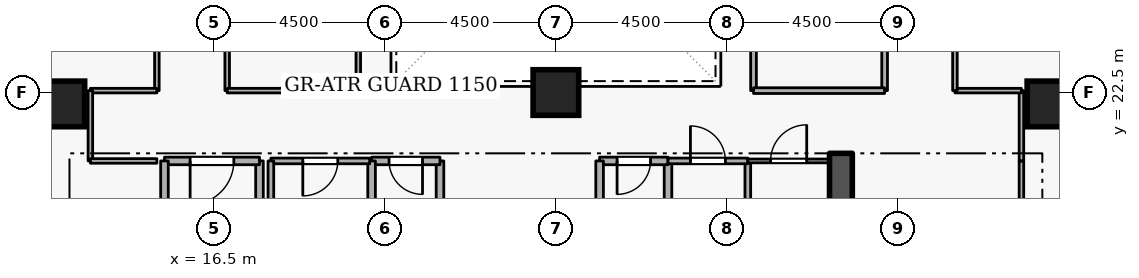
"""IFC4 building model, lengths in metres.
Left out: names, types, materials, properties, quantities, classifications, styles, units other than length and angle.
Written with IfcOpenShell. Run it as: python <this file> out.ifc"""

import sys

from ifc_helpers import new_model, si_unit, direction, frame, frame_2d, origin, origin_2d, place, context, subcontext, project, spatial, rectangle, extrude, element, fill, save


model = new_model("IFC4")
c1 = context("Model", 3, precision=1e-05, world=origin(), true_north=direction((0.0, 1.0)))
c2 = subcontext(c1, "Body", "Model", "MODEL_VIEW")
j1 = project(units=[si_unit("LENGTHUNIT", "METRE"), si_unit("PLANEANGLEUNIT", "RADIAN")], contexts=[c1])
p1 = place(None, origin())
s1 = spatial("IfcSite", under=j1, at=p1, CompositionType="ELEMENT")
p2 = place(p1, origin())
s2 = spatial("IfcBuilding", under=s1, at=p2, CompositionType="ELEMENT")
p3 = place(p2, frame((0.0, 0.0, 108.9)))
s3 = spatial("IfcBuildingStorey", under=s2, at=p3, CompositionType="ELEMENT", Elevation=108.9)
p4 = place(p3, frame((33.0, 15.2, 0.0), z_axis=(0.0, 0.0, 1.0), x_axis=(0.0, 1.0, 0.0)))
e1 = element("IfcWall", 1, at=p4, inside=s3, PredefinedType="SHEAR", context=c2, shape_type="SweptSolid", body=[
    extrude(rectangle(XDim=5.7, YDim=0.6, at=frame_2d((2.85, 0.0))), origin(), (0.0, 0.0, 1.0), 3.6),
])
for number, where, z_axis, x_axis in (
    (2, (12.5, 22.2, 0.0), (0.0, 0.0, 1.0), (1.0, 0.0, 0.0)),
    (3, (38.5, 22.2, 0.0), (0.0, 0.0, 1.0), (1.0, 0.0, 0.0)),
    (4, (25.5, 22.5, 0.0), (0.0, 0.0, 1.0), (1.0, 0.0, 0.0)),
):
    element("IfcColumn", number, at=place(p3, frame(where, z_axis=z_axis, x_axis=x_axis)), inside=s3, PredefinedType="COLUMN", context=c2, shape_type="SweptSolid", body=[
        extrude(rectangle(XDim=1.2, YDim=1.2, at=origin_2d()), origin(), (0.0, 0.0, 1.0), 3.6),
    ])
p5 = place(p3, frame((17.7, 18.4, 0.0), z_axis=(0.0, 0.0, 1.0), x_axis=(0.0, 1.0, 0.0)))
e5 = element("IfcWall", 5, at=p5, inside=s3, PredefinedType="STANDARD", context=c2, shape_type="SweptSolid", body=[
    extrude(rectangle(XDim=2.3, YDim=0.2, at=frame_2d((1.15, 0.0))), origin(), (0.0, 0.0, 1.0), 2.545),
])
p6 = place(p3, frame((17.7, 20.7, 0.0), z_axis=(0.0, 0.0, 1.0), x_axis=(-1.0, 0.0, 0.0)))
e6 = element("IfcWall", 6, at=p6, inside=s3, PredefinedType="STANDARD", context=c2, shape_type="SweptSolid", body=[
    extrude(rectangle(XDim=2.5, YDim=0.2, at=frame_2d((1.25, 0.0))), origin(), (0.0, 0.0, 1.0), 3.34),
])
p7 = place(p6, frame((0.675, 0.0, 0.0)))
e7 = element("IfcOpeningElement", 7, at=p7, cuts=e6, PredefinedType="OPENING", context=c2, shape_type="SweptSolid", body=[
    extrude(rectangle(XDim=1.15, YDim=2.1, at=frame_2d((0.575, 1.05))), frame((0.0, 0.11, 0.0), z_axis=(0.0, -1.0, 0.0), x_axis=(1.0, 0.0, 0.0)), (0.0, 0.0, 1.0), 0.22),
])
p8 = place(p3, frame((15.2, 20.7, 0.0), z_axis=(0.0, 0.0, 1.0), x_axis=(0.0, -1.0, 0.0)))
e8 = element("IfcWall", 8, at=p8, inside=s3, PredefinedType="STANDARD", context=c2, shape_type="SweptSolid", body=[
    extrude(rectangle(XDim=5.7, YDim=0.2, at=frame_2d((2.85, 0.0))), origin(), (0.0, 0.0, 1.0), 3.34),
])
p9 = place(p3, frame((28.45, 18.65, 0.0), z_axis=(0.0, 0.0, 1.0), x_axis=(0.0, 1.0, 0.0)))
e9 = element("IfcWall", 9, at=p9, inside=s3, PredefinedType="STANDARD", context=c2, shape_type="SweptSolid", body=[
    extrude(rectangle(XDim=2.05, YDim=0.2, at=frame_2d((1.025, 0.0))), origin(), (0.0, 0.0, 1.0), 3.34),
])
p10 = place(p3, frame((28.45, 20.7, 0.0), z_axis=(0.0, 0.0, 1.0), x_axis=(-1.0, 0.0, 0.0)))
e10 = element("IfcWall", 10, at=p10, inside=s3, PredefinedType="STANDARD", context=c2, shape_type="SweptSolid", body=[
    extrude(rectangle(XDim=1.8, YDim=0.2, at=frame_2d((0.9, 0.0))), origin(), (0.0, 0.0, 1.0), 3.34),
])
p11 = place(p10, frame((0.46, 0.0, 0.0)))
e11 = element("IfcOpeningElement", 11, at=p11, cuts=e10, PredefinedType="OPENING", context=c2, shape_type="SweptSolid", body=[
    extrude(rectangle(XDim=0.88, YDim=2.04, at=frame_2d((0.44, 1.02))), frame((0.0, 0.11, 0.0), z_axis=(0.0, -1.0, 0.0), x_axis=(1.0, 0.0, 0.0)), (0.0, 0.0, 1.0), 0.22),
])
for number, where, z_axis, x_axis in (
    (12, (26.65, 20.7, 0.0), (0.0, 0.0, 1.0), (0.0, -1.0, 0.0)),
    (13, (22.45, 18.65, 0.0), (0.0, 0.0, 1.0), (0.0, 1.0, 0.0)),
):
    element("IfcWall", number, at=place(p3, frame(where, z_axis=z_axis, x_axis=x_axis)), inside=s3, PredefinedType="STANDARD", context=c2, shape_type="SweptSolid", body=[
        extrude(rectangle(XDim=2.05, YDim=0.2, at=frame_2d((1.025, 0.0))), origin(), (0.0, 0.0, 1.0), 3.34),
    ])
p12 = place(p3, frame((22.45, 20.7, 0.0), z_axis=(0.0, 0.0, 1.0), x_axis=(-1.0, 0.0, 0.0)))
e14 = element("IfcWall", 14, at=p12, inside=s3, PredefinedType="STANDARD", context=c2, shape_type="SweptSolid", body=[
    extrude(rectangle(XDim=1.8, YDim=0.2, at=frame_2d((0.9, 0.0))), origin(), (0.0, 0.0, 1.0), 3.34),
])
p13 = place(p12, frame((0.46, 0.0, 0.0)))
e15 = element("IfcOpeningElement", 15, at=p13, cuts=e14, PredefinedType="OPENING", context=c2, shape_type="SweptSolid", body=[
    extrude(rectangle(XDim=0.88, YDim=2.04, at=frame_2d((0.44, 1.02))), frame((0.0, 0.11, 0.0), z_axis=(0.0, -1.0, 0.0), x_axis=(1.0, 0.0, 0.0)), (0.0, 0.0, 1.0), 0.22),
])
p14 = place(p3, frame((20.65, 20.7, 0.0), z_axis=(0.0, 0.0, 1.0), x_axis=(0.0, -1.0, 0.0)))
e16 = element("IfcWall", 16, at=p14, inside=s3, PredefinedType="STANDARD", context=c2, shape_type="SweptSolid", body=[
    extrude(rectangle(XDim=2.05, YDim=0.2, at=frame_2d((1.025, 0.0))), origin(), (0.0, 0.0, 1.0), 3.34),
])
p15 = place(p3, frame((20.6, 20.7, 0.0), z_axis=(0.0, 0.0, 1.0), x_axis=(-1.0, 0.0, 0.0)))
e17 = element("IfcWall", 17, at=p15, inside=s3, PredefinedType="PARTITIONING", context=c2, shape_type="SweptSolid", body=[
    extrude(rectangle(XDim=2.6, YDim=0.15, at=frame_2d((1.3, 0.0))), origin(), (0.0, 0.0, 1.0), 3.34),
])
p16 = place(p15, frame((0.84, 0.0, 0.0)))
e18 = element("IfcOpeningElement", 18, at=p16, cuts=e17, PredefinedType="OPENING", context=c2, shape_type="SweptSolid", body=[
    extrude(rectangle(XDim=0.92, YDim=2.08, at=frame_2d((0.46, 1.04))), frame((0.0, 0.085, 0.0), z_axis=(0.0, -1.0, 0.0), x_axis=(1.0, 0.0, 0.0)), (0.0, 0.0, 1.0), 0.17),
])
p17 = place(p3, frame((18.0, 20.7, 0.0), z_axis=(0.0, 0.0, 1.0), x_axis=(0.0, -1.0, 0.0)))
e19 = element("IfcWall", 19, at=p17, inside=s3, PredefinedType="PARTITIONING", context=c2, shape_type="SweptSolid", body=[
    extrude(rectangle(XDim=2.05, YDim=0.15, at=frame_2d((1.025, 0.0))), origin(), (0.0, 0.0, 1.0), 2.545),
])
p18 = place(p3, frame((30.55, 20.7, 0.0), z_axis=(0.0, 0.0, 1.0), x_axis=(0.0, -1.0, 0.0)))
e20 = element("IfcWall", 20, at=p18, inside=s3, PredefinedType="PARTITIONING", context=c2, shape_type="SweptSolid", body=[
    extrude(rectangle(XDim=2.05, YDim=0.15, at=frame_2d((1.025, 0.0))), origin(), (0.0, 0.0, 1.0), 3.34),
])
p19 = place(p3, frame((28.45, 20.7, 0.0), z_axis=(0.0, 0.0, 1.0), x_axis=(1.0, 0.0, 0.0)))
e21 = element("IfcWall", 21, at=p19, inside=s3, PredefinedType="PARTITIONING", context=c2, shape_type="SweptSolid", body=[
    extrude(rectangle(XDim=2.1, YDim=0.15, at=frame_2d((1.05, 0.0))), origin(), (0.0, 0.0, 1.0), 3.34),
])
p20 = place(p19, frame((0.59, 0.0, 0.0)))
e22 = element("IfcOpeningElement", 22, at=p20, cuts=e21, PredefinedType="OPENING", context=c2, shape_type="SweptSolid", body=[
    extrude(rectangle(XDim=0.92, YDim=2.08, at=frame_2d((0.46, 1.04))), frame((0.0, 0.085, 0.0), z_axis=(0.0, -1.0, 0.0), x_axis=(1.0, 0.0, 0.0)), (0.0, 0.0, 1.0), 0.17),
])
p21 = place(p3, frame((30.55, 20.7, 0.0), z_axis=(0.0, 0.0, 1.0), x_axis=(1.0, 0.0, 0.0)))
e23 = element("IfcWall", 23, at=p21, inside=s3, PredefinedType="PARTITIONING", context=c2, shape_type="SweptSolid", body=[
    extrude(rectangle(XDim=2.15, YDim=0.1, at=frame_2d((1.075, 0.0))), origin(), (0.0, 0.0, 1.0), 3.34),
])
p22 = place(p21, frame((0.6, 0.0, 0.0)))
e24 = element("IfcOpeningElement", 24, at=p22, cuts=e23, PredefinedType="OPENING", context=c2, shape_type="SweptSolid", body=[
    extrude(rectangle(XDim=0.95, YDim=2.1, at=frame_2d((0.475, 1.05))), frame((0.0, 0.06, 0.0), z_axis=(0.0, -1.0, 0.0), x_axis=(1.0, 0.0, 0.0)), (0.0, 0.0, 1.0), 0.12),
])
p23 = place(p3, frame((15.0, 27.0, 0.0), z_axis=(0.0, 0.0, 1.0), x_axis=(0.0, -1.0, 0.0)))
e25 = element("IfcWall", 25, at=p23, inside=s3, PredefinedType="PARTITIONING", context=c2, shape_type="SweptSolid", body=[
    extrude(rectangle(XDim=4.45, YDim=0.12, at=frame_2d((2.225, 0.0))), origin(), (0.0, 0.0, 1.0), 3.34),
])
p24 = place(p23, frame((1.7, 0.0, 0.0)))
e26 = element("IfcOpeningElement", 26, at=p24, cuts=e25, PredefinedType="OPENING", context=c2, shape_type="SweptSolid", body=[
    extrude(rectangle(XDim=1.05, YDim=2.1, at=frame_2d((0.525, 1.05))), frame((0.0, 0.07, 0.0), z_axis=(0.0, -1.0, 0.0), x_axis=(1.0, 0.0, 0.0)), (0.0, 0.0, 1.0), 0.14),
])
p25 = place(p3, frame((15.0, 22.55, 0.0), z_axis=(0.0, 0.0, 1.0), x_axis=(-1.0, 0.0, 0.0)))
e27 = element("IfcWall", 27, at=p25, inside=s3, PredefinedType="PARTITIONING", context=c2, shape_type="SweptSolid", body=[
    extrude(rectangle(XDim=1.75, YDim=0.12, at=frame_2d((0.875, 0.0))), origin(), (0.0, 0.0, 1.0), 3.34),
])
p26 = place(p3, frame((13.25, 22.55, 0.0), z_axis=(0.0, 0.0, 1.0), x_axis=(0.0, -1.0, 0.0)))
e28 = element("IfcWall", 28, at=p26, inside=s3, PredefinedType="PARTITIONING", context=c2, shape_type="SweptSolid", body=[
    extrude(rectangle(XDim=1.85, YDim=0.12, at=frame_2d((0.925, 0.0))), origin(), (0.0, 0.0, 1.0), 3.34),
])
p27 = place(p3, frame((13.25, 20.7, 0.0), z_axis=(0.0, 0.0, 1.0), x_axis=(1.0, 0.0, 0.0)))
e29 = element("IfcWall", 29, at=p27, inside=s3, PredefinedType="PARTITIONING", context=c2, shape_type="SweptSolid", body=[
    extrude(rectangle(XDim=1.75, YDim=0.12, at=frame_2d((0.875, 0.0))), origin(), (0.0, 0.0, 1.0), 3.34),
])
p28 = place(p3, frame((37.75, 17.55, 0.0), z_axis=(0.0, 0.0, 1.0), x_axis=(0.0, 1.0, 0.0)))
e30 = element("IfcWall", 30, at=p28, inside=s3, PredefinedType="PARTITIONING", context=c2, shape_type="SweptSolid", body=[
    extrude(rectangle(XDim=3.15, YDim=0.12, at=frame_2d((1.575, 0.0))), origin(), (0.0, 0.0, 1.0), 3.34),
])
p29 = place(p3, frame((37.75, 20.7, 0.0), z_axis=(0.0, 0.0, 1.0), x_axis=(0.0, 1.0, 0.0)))
e31 = element("IfcWall", 31, at=p29, inside=s3, PredefinedType="PARTITIONING", context=c2, shape_type="SweptSolid", body=[
    extrude(rectangle(XDim=1.85, YDim=0.12, at=frame_2d((0.925, 0.0))), origin(), (0.0, 0.0, 1.0), 3.34),
])
p30 = place(p3, frame((37.75, 22.55, 0.0), z_axis=(0.0, 0.0, 1.0), x_axis=(-1.0, 0.0, 0.0)))
e32 = element("IfcWall", 32, at=p30, inside=s3, PredefinedType="PARTITIONING", context=c2, shape_type="SweptSolid", body=[
    extrude(rectangle(XDim=1.75, YDim=0.12, at=frame_2d((0.875, 0.0))), origin(), (0.0, 0.0, 1.0), 3.34),
])
p31 = place(p3, frame((36.0, 22.55, 0.0), z_axis=(0.0, 0.0, 1.0), x_axis=(0.0, 1.0, 0.0)))
e33 = element("IfcWall", 33, at=p31, inside=s3, PredefinedType="PARTITIONING", context=c2, shape_type="SweptSolid", body=[
    extrude(rectangle(XDim=4.45, YDim=0.12, at=frame_2d((2.225, 0.0))), origin(), (0.0, 0.0, 1.0), 3.34),
])
p32 = place(p31, frame((1.7, 0.0, 0.0)))
e34 = element("IfcOpeningElement", 34, at=p32, cuts=e33, PredefinedType="OPENING", context=c2, shape_type="SweptSolid", body=[
    extrude(rectangle(XDim=1.05, YDim=2.1, at=frame_2d((0.525, 1.05))), frame((0.0, 0.07, 0.0), z_axis=(0.0, -1.0, 0.0), x_axis=(1.0, 0.0, 0.0)), (0.0, 0.0, 1.0), 0.14),
])
p33 = place(p3, frame((30.7, 22.55, 0.0), z_axis=(0.0, 0.0, 1.0), x_axis=(0.0, 1.0, 0.0)))
e35 = element("IfcWall", 35, at=p33, inside=s3, PredefinedType="PARTITIONING", context=c2, shape_type="SweptSolid", body=[
    extrude(rectangle(XDim=8.9, YDim=0.15, at=frame_2d((4.45, 0.0))), origin(), (0.0, 0.0, 1.0), 3.34),
])
p34 = place(p3, frame((34.15, 31.45, 0.0), z_axis=(0.0, 0.0, 1.0), x_axis=(0.0, -1.0, 0.0)))
e36 = element("IfcWall", 36, at=p34, inside=s3, PredefinedType="PARTITIONING", context=c2, shape_type="SweptSolid", body=[
    extrude(rectangle(XDim=8.9, YDim=0.15, at=frame_2d((4.45, 0.0))), origin(), (0.0, 0.0, 1.0), 3.34),
])
p35 = place(p34, frame((3.8, 0.0, 0.0)))
e37 = element("IfcOpeningElement", 37, at=p35, cuts=e36, PredefinedType="OPENING", context=c2, shape_type="SweptSolid", body=[
    extrude(rectangle(XDim=1.3, YDim=2.12, at=frame_2d((0.65, 1.06))), frame((0.0, 0.085, 0.0), z_axis=(0.0, -1.0, 0.0), x_axis=(1.0, 0.0, 0.0)), (0.0, 0.0, 1.0), 0.17),
])
p36 = place(p3, frame((34.15, 22.55, 0.0), z_axis=(0.0, 0.0, 1.0), x_axis=(-1.0, 0.0, 0.0)))
e38 = element("IfcWall", 38, at=p36, inside=s3, PredefinedType="PARTITIONING", context=c2, shape_type="SweptSolid", body=[
    extrude(rectangle(XDim=3.45, YDim=0.15, at=frame_2d((1.725, 0.0))), origin(), (0.0, 0.0, 1.0), 3.34),
])
p37 = place(p3, frame((16.85, 22.55, 0.0), z_axis=(0.0, 0.0, 1.0), x_axis=(0.0, 1.0, 0.0)))
e39 = element("IfcWall", 39, at=p37, inside=s3, PredefinedType="PARTITIONING", context=c2, shape_type="SweptSolid", body=[
    extrude(rectangle(XDim=8.9, YDim=0.12, at=frame_2d((4.45, 0.0))), origin(), (0.0, 0.0, 1.0), 3.34),
])
p38 = place(p37, frame((3.975, 0.0, 0.0)))
e40 = element("IfcOpeningElement", 40, at=p38, cuts=e39, PredefinedType="OPENING", context=c2, shape_type="SweptSolid", body=[
    extrude(rectangle(XDim=0.95, YDim=2.1, at=frame_2d((0.475, 1.05))), frame((0.0, 0.07, 0.0), z_axis=(0.0, -1.0, 0.0), x_axis=(1.0, 0.0, 0.0)), (0.0, 0.0, 1.0), 0.14),
])
p39 = place(p3, frame((20.3, 31.45, 0.0), z_axis=(0.0, 0.0, 1.0), x_axis=(0.0, -1.0, 0.0)))
e41 = element("IfcWall", 41, at=p39, inside=s3, PredefinedType="PARTITIONING", context=c2, shape_type="SweptSolid", body=[
    extrude(rectangle(XDim=8.9, YDim=0.12, at=frame_2d((4.45, 0.0))), origin(), (0.0, 0.0, 1.0), 3.34),
])
p40 = place(p3, frame((20.3, 22.55, 0.0), z_axis=(0.0, 0.0, 1.0), x_axis=(-1.0, 0.0, 0.0)))
e42 = element("IfcWall", 42, at=p40, inside=s3, PredefinedType="PARTITIONING", context=c2, shape_type="SweptSolid", body=[
    extrude(rectangle(XDim=3.45, YDim=0.12, at=frame_2d((1.725, 0.0))), origin(), (0.0, 0.0, 1.0), 3.34),
])
p41 = place(p7, origin())
e43 = element("IfcDoor", 43, at=p41, inside=s3, OperationType="SINGLE_SWING_RIGHT", PredefinedType="DOOR", context=c2, shape_type="SweptSolid", body=[
    extrude(rectangle(XDim=1.15, YDim=2.1, at=frame_2d((0.575, 1.05))), frame((0.0, 0.025, 0.0), z_axis=(0.0, -1.0, 0.0), x_axis=(1.0, 0.0, 0.0)), (0.0, 0.0, 1.0), 0.05),
])
fill(e7, e43)
p42 = place(p11, origin())
e44 = element("IfcDoor", 44, at=p42, inside=s3, OperationType="SINGLE_SWING_RIGHT", PredefinedType="DOOR", context=c2, shape_type="SweptSolid", body=[
    extrude(rectangle(XDim=0.88, YDim=2.04, at=frame_2d((0.44, 1.02))), frame((0.0, 0.025, 0.0), z_axis=(0.0, -1.0, 0.0), x_axis=(1.0, 0.0, 0.0)), (0.0, 0.0, 1.0), 0.05),
])
fill(e11, e44)
p43 = place(p13, origin())
e45 = element("IfcDoor", 45, at=p43, inside=s3, OperationType="SINGLE_SWING_LEFT", PredefinedType="DOOR", context=c2, shape_type="SweptSolid", body=[
    extrude(rectangle(XDim=0.88, YDim=2.04, at=frame_2d((0.44, 1.02))), frame((0.0, 0.025, 0.0), z_axis=(0.0, -1.0, 0.0), x_axis=(1.0, 0.0, 0.0)), (0.0, 0.0, 1.0), 0.05),
])
fill(e15, e45)
p44 = place(p16, origin())
e46 = element("IfcDoor", 46, at=p44, inside=s3, OperationType="SINGLE_SWING_RIGHT", PredefinedType="DOOR", context=c2, shape_type="SweptSolid", body=[
    extrude(rectangle(XDim=0.92, YDim=2.08, at=frame_2d((0.46, 1.04))), frame((0.0, 0.025, 0.0), z_axis=(0.0, -1.0, 0.0), x_axis=(1.0, 0.0, 0.0)), (0.0, 0.0, 1.0), 0.05),
])
fill(e18, e46)
p45 = place(p20, origin())
e47 = element("IfcDoor", 47, at=p45, inside=s3, OperationType="SINGLE_SWING_LEFT", PredefinedType="DOOR", context=c2, shape_type="SweptSolid", body=[
    extrude(rectangle(XDim=0.92, YDim=2.08, at=frame_2d((0.46, 1.04))), frame((0.0, 0.025, 0.0), z_axis=(0.0, -1.0, 0.0), x_axis=(1.0, 0.0, 0.0)), (0.0, 0.0, 1.0), 0.05),
])
fill(e22, e47)
p46 = place(p22, origin())
e48 = element("IfcDoor", 48, at=p46, inside=s3, OperationType="SINGLE_SWING_RIGHT", PredefinedType="DOOR", context=c2, shape_type="SweptSolid", body=[
    extrude(rectangle(XDim=0.95, YDim=2.1, at=frame_2d((0.475, 1.05))), frame((0.0, 0.025, 0.0), z_axis=(0.0, -1.0, 0.0), x_axis=(1.0, 0.0, 0.0)), (0.0, 0.0, 1.0), 0.05),
])
fill(e24, e48)
save(model, sys.argv[1])
